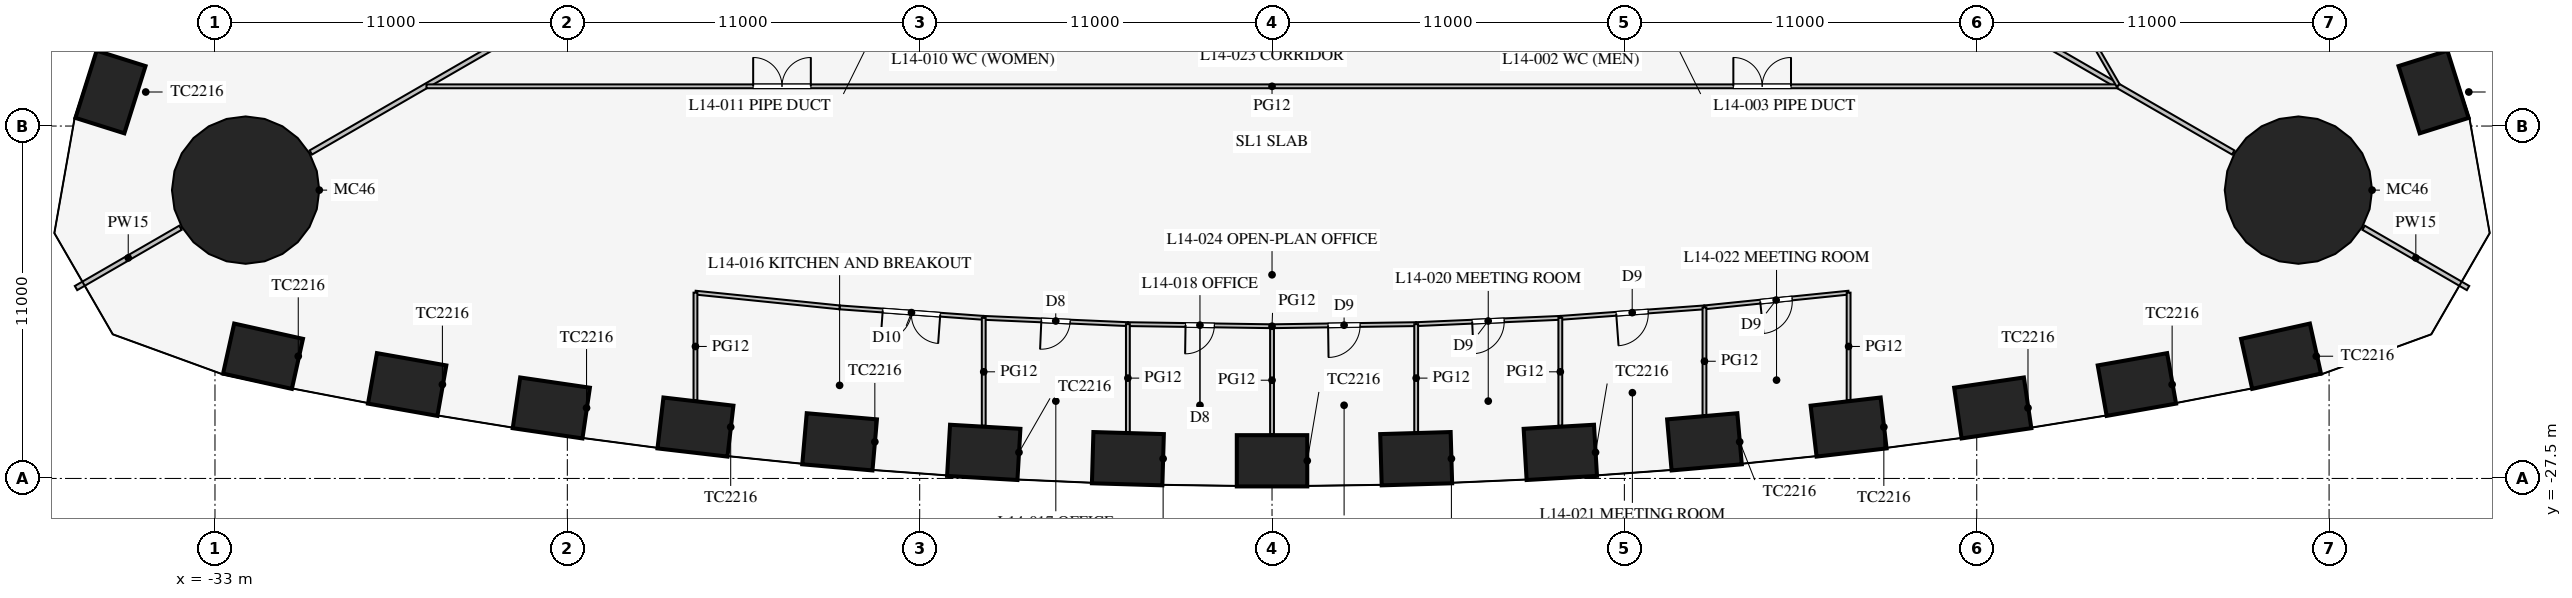
"""IFC4 building model, lengths in metres.
Left out: names, types, materials, properties, quantities, classifications, styles, units other than length and angle.
Written with IfcOpenShell. Run it as: python <this file> out.ifc"""

import sys

from ifc_helpers import new_model, si_unit, direction, frame, frame_2d, origin, origin_2d, place, context, subcontext, project, spatial, rectangle, circle, extrude, element, fill, save


model = new_model("IFC4")
c1 = context("Model", 3, precision=1e-05, world=origin(), true_north=direction((0.0, 1.0)))
c2 = subcontext(c1, "Body", "Model", "MODEL_VIEW")
j1 = project(units=[si_unit("LENGTHUNIT", "METRE"), si_unit("PLANEANGLEUNIT", "RADIAN")], contexts=[c1])
p1 = place(None, origin())
s1 = spatial("IfcSite", under=j1, at=p1, CompositionType="ELEMENT")
p2 = place(p1, origin())
s2 = spatial("IfcBuilding", under=s1, at=p2, CompositionType="ELEMENT")
p3 = place(p2, frame((0.0, 0.0, 62.7)))
s3 = spatial("IfcBuildingStorey", under=s2, at=p3, CompositionType="ELEMENT", Elevation=62.7)
for number, where, z_axis, x_axis in (
    (1, (-31.5, -23.685, 0.0), (0.0, 0.0, 1.0), (0.976, -0.217, 0.0)),
    (2, (-27.0, -24.568, 0.0), (0.0, 0.0, 1.0), (0.985, -0.174, 0.0)),
    (3, (-22.5, -25.299, 0.0), (0.0, 0.0, 1.0), (0.989, -0.145, 0.0)),
    (4, (-18.0, -25.895, 0.0), (0.0, 0.0, 1.0), (0.993, -0.116, 0.0)),
    (5, (-13.5, -26.357, 0.0), (0.0, 0.0, 1.0), (0.996, -0.087, 0.0)),
    (6, (-9.0, -26.686, 0.0), (0.0, 0.0, 1.0), (0.998, -0.058, 0.0)),
    (7, (-4.5, -26.883, 0.0), (0.0, 0.0, 1.0), (1.0, -0.029, 0.0)),
    (8, (0.0, -26.949, 0.0), (0.0, 0.0, 1.0), (1.0, 0.0, 0.0)),
    (9, (4.5, -26.883, 0.0), (0.0, 0.0, 1.0), (1.0, 0.029, 0.0)),
    (10, (9.0, -26.686, 0.0), (0.0, 0.0, 1.0), (0.998, 0.058, 0.0)),
    (11, (13.5, -26.357, 0.0), (0.0, 0.0, 1.0), (0.996, 0.087, 0.0)),
    (12, (18.0, -25.895, 0.0), (0.0, 0.0, 1.0), (0.993, 0.116, 0.0)),
    (13, (22.5, -25.299, 0.0), (0.0, 0.0, 1.0), (0.989, 0.145, 0.0)),
    (14, (27.0, -24.568, 0.0), (0.0, 0.0, 1.0), (0.985, 0.174, 0.0)),
    (15, (31.5, -23.685, 0.0), (0.0, 0.0, 1.0), (0.976, 0.217, 0.0)),
    (16, (36.262, -15.438, 0.0), (0.0, 0.0, 1.0), (-0.3, 0.954, 0.0)),
    (17, (-36.262, -15.438, 0.0), (0.0, 0.0, 1.0), (-0.3, -0.954, 0.0)),
):
    element("IfcColumn", number, at=place(p3, frame(where, z_axis=z_axis, x_axis=x_axis)), inside=s3, PredefinedType="COLUMN", context=c2, shape_type="SweptSolid", body=[
        extrude(rectangle(XDim=2.2, YDim=1.6, at=origin_2d()), origin(), (0.0, 0.0, 1.0), 4.2),
    ])
for number, where, z_axis, x_axis in (
    (18, (32.043, -18.5, 0.0), (0.0, 0.0, 1.0), (1.0, 0.0, 0.0)),
    (19, (-32.043, -18.5, 0.0), (0.0, 0.0, 1.0), (1.0, 0.0, 0.0)),
):
    element("IfcColumn", number, at=place(p3, frame(where, z_axis=z_axis, x_axis=x_axis)), inside=s3, PredefinedType="COLUMN", context=c2, shape_type="SweptSolid", body=[
        extrude(circle(Radius=2.3, at=origin_2d()), origin(), (0.0, 0.0, 1.0), 4.2),
    ])
p4 = place(p3, frame((14.203, -8.2, 0.0), z_axis=(0.0, 0.0, 1.0), x_axis=(0.866024965723, -0.500000758745, 0.0)))
e20 = element("IfcWall", 20, at=p4, inside=s3, PredefinedType="PARTITIONING", context=c2, shape_type="SweptSolid", body=[
    extrude(rectangle(XDim=18.25, YDim=0.15, at=frame_2d((9.125, 0.0))), origin(), (0.0, 0.0, 1.0), 2.3),
])
p5 = place(p3, frame((34.078, -19.675, 0.0), z_axis=(0.0, 0.0, 1.0), x_axis=(0.866019247219, -0.500010663332, 0.0)))
e21 = element("IfcWall", 21, at=p5, inside=s3, PredefinedType="PARTITIONING", context=c2, shape_type="SweptSolid", body=[
    extrude(rectangle(XDim=3.764, YDim=0.15, at=frame_2d((1.882, 0.0))), origin(), (0.0, 0.0, 1.0), 2.3),
])
p6 = place(p3, frame((-14.203, -8.2, 0.0), z_axis=(0.0, 0.0, 1.0), x_axis=(-0.866024965723, -0.500000758745, 0.0)))
e22 = element("IfcWall", 22, at=p6, inside=s3, PredefinedType="PARTITIONING", context=c2, shape_type="SweptSolid", body=[
    extrude(rectangle(XDim=18.25, YDim=0.15, at=frame_2d((9.125, 0.0))), origin(), (0.0, 0.0, 1.0), 2.3),
])
p7 = place(p3, frame((-34.078, -19.675, 0.0), z_axis=(0.0, 0.0, 1.0), x_axis=(-0.866019247219, -0.500010663332, 0.0)))
e23 = element("IfcWall", 23, at=p7, inside=s3, PredefinedType="PARTITIONING", context=c2, shape_type="SweptSolid", body=[
    extrude(rectangle(XDim=3.764, YDim=0.15, at=frame_2d((1.882, 0.0))), origin(), (0.0, 0.0, 1.0), 2.3),
])
p8 = place(p3, frame((-26.398, -15.26, 0.0), z_axis=(0.0, 0.0, 1.0), x_axis=(1.0, 0.0, 0.0)))
e24 = element("IfcWall", 24, at=p8, inside=s3, PredefinedType="PARTITIONING", context=c2, shape_type="SweptSolid", body=[
    extrude(rectangle(XDim=52.796, YDim=0.12, at=frame_2d((26.398, 0.0))), origin(), (0.0, 0.0, 1.0), 2.9),
])
p9 = place(p8, frame((10.2, 0.0, 0.15)))
e25 = element("IfcOpeningElement", 25, at=p9, cuts=e24, PredefinedType="OPENING", context=c2, shape_type="SweptSolid", body=[
    extrude(rectangle(XDim=1.8, YDim=2.1, at=frame_2d((0.9, 1.05))), frame((0.0, 0.07, 0.0), z_axis=(0.0, -1.0, 0.0), x_axis=(1.0, 0.0, 0.0)), (0.0, 0.0, 1.0), 0.14),
])
p10 = place(p8, frame((40.8, 0.0, 0.15)))
e26 = element("IfcOpeningElement", 26, at=p10, cuts=e24, PredefinedType="OPENING", context=c2, shape_type="SweptSolid", body=[
    extrude(rectangle(XDim=1.8, YDim=2.1, at=frame_2d((0.9, 1.05))), frame((0.0, 0.07, 0.0), z_axis=(0.0, -1.0, 0.0), x_axis=(1.0, 0.0, 0.0)), (0.0, 0.0, 1.0), 0.14),
])
p11 = place(p3, frame((0.0, -22.749, 0.0), z_axis=(0.0, 0.0, 1.0), x_axis=(0.999894311967, 0.014538393859, 0.0)))
e27 = element("IfcWall", 27, at=p11, inside=s3, PredefinedType="PARTITIONING", context=c2, shape_type="SweptSolid", body=[
    extrude(rectangle(XDim=4.5, YDim=0.12, at=frame_2d((2.25, 0.0))), origin(), (0.0, 0.0, 1.0), 2.9),
])
p12 = place(p11, frame((1.75, 0.0, 0.15)))
e28 = element("IfcOpeningElement", 28, at=p12, cuts=e27, PredefinedType="OPENING", context=c2, shape_type="SweptSolid", body=[
    extrude(rectangle(XDim=1.0, YDim=2.1, at=frame_2d((0.5, 1.05))), frame((0.0, 0.07, 0.0), z_axis=(0.0, -1.0, 0.0), x_axis=(1.0, 0.0, 0.0)), (0.0, 0.0, 1.0), 0.14),
])
p13 = place(p3, frame((13.5, -22.16, 0.0), z_axis=(0.0, 0.0, 1.0), x_axis=(0.994833141332, 0.101523499286, 0.0)))
e29 = element("IfcWall", 29, at=p13, inside=s3, PredefinedType="PARTITIONING", context=c2, shape_type="SweptSolid", body=[
    extrude(rectangle(XDim=4.523, YDim=0.12, at=frame_2d((2.262, 0.0))), origin(), (0.0, 0.0, 1.0), 2.9),
])
p14 = place(p13, frame((1.75, 0.0, 0.15)))
e30 = element("IfcOpeningElement", 30, at=p14, cuts=e29, PredefinedType="OPENING", context=c2, shape_type="SweptSolid", body=[
    extrude(rectangle(XDim=1.0, YDim=2.1, at=frame_2d((0.5, 1.05))), frame((0.0, 0.07, 0.0), z_axis=(0.0, -1.0, 0.0), x_axis=(1.0, 0.0, 0.0)), (0.0, 0.0, 1.0), 0.14),
])
p15 = place(p3, frame((4.5, -22.683, 0.0), z_axis=(0.0, 0.0, 1.0), x_axis=(0.999052370647, 0.043524254212, 0.0)))
e31 = element("IfcWall", 31, at=p15, inside=s3, PredefinedType="PARTITIONING", context=c2, shape_type="SweptSolid", body=[
    extrude(rectangle(XDim=4.504, YDim=0.12, at=frame_2d((2.252, 0.0))), origin(), (0.0, 0.0, 1.0), 2.9),
])
p16 = place(p15, frame((1.75, 0.0, 0.15)))
e32 = element("IfcOpeningElement", 32, at=p16, cuts=e31, PredefinedType="OPENING", context=c2, shape_type="SweptSolid", body=[
    extrude(rectangle(XDim=1.0, YDim=2.1, at=frame_2d((0.5, 1.05))), frame((0.0, 0.07, 0.0), z_axis=(0.0, -1.0, 0.0), x_axis=(1.0, 0.0, 0.0)), (0.0, 0.0, 1.0), 0.14),
])
p17 = place(p3, frame((9.0, -22.487, 0.0), z_axis=(0.0, 0.0, 1.0), x_axis=(0.997363894896, 0.072562119306, 0.0)))
e33 = element("IfcWall", 33, at=p17, inside=s3, PredefinedType="PARTITIONING", context=c2, shape_type="SweptSolid", body=[
    extrude(rectangle(XDim=4.512, YDim=0.12, at=frame_2d((2.256, 0.0))), origin(), (0.0, 0.0, 1.0), 2.9),
])
p18 = place(p17, frame((1.75, 0.0, 0.15)))
e34 = element("IfcOpeningElement", 34, at=p18, cuts=e33, PredefinedType="OPENING", context=c2, shape_type="SweptSolid", body=[
    extrude(rectangle(XDim=1.0, YDim=2.1, at=frame_2d((0.5, 1.05))), frame((0.0, 0.07, 0.0), z_axis=(0.0, -1.0, 0.0), x_axis=(1.0, 0.0, 0.0)), (0.0, 0.0, 1.0), 0.14),
])
p19 = place(p3, frame((-13.5, -22.16, 0.0), z_axis=(0.0, 0.0, 1.0), x_axis=(0.997363894896, -0.072562119306, 0.0)))
e35 = element("IfcWall", 35, at=p19, inside=s3, PredefinedType="PARTITIONING", context=c2, shape_type="SweptSolid", body=[
    extrude(rectangle(XDim=4.512, YDim=0.12, at=frame_2d((2.256, 0.0))), origin(), (0.0, 0.0, 1.0), 2.9),
])
p20 = place(p19, frame((1.35, 0.0, 0.15)))
e36 = element("IfcOpeningElement", 36, at=p20, cuts=e35, PredefinedType="OPENING", context=c2, shape_type="SweptSolid", body=[
    extrude(rectangle(XDim=1.8, YDim=2.1, at=frame_2d((0.9, 1.05))), frame((0.0, 0.07, 0.0), z_axis=(0.0, -1.0, 0.0), x_axis=(1.0, 0.0, 0.0)), (0.0, 0.0, 1.0), 0.14),
])
p21 = place(p3, frame((-18.0, -21.701, 0.0), z_axis=(0.0, 0.0, 1.0), x_axis=(0.994833141332, -0.101523499286, 0.0)))
e37 = element("IfcWall", 37, at=p21, inside=s3, PredefinedType="PARTITIONING", context=c2, shape_type="SweptSolid", body=[
    extrude(rectangle(XDim=4.523, YDim=0.12, at=frame_2d((2.262, 0.0))), origin(), (0.0, 0.0, 1.0), 2.9),
])
p22 = place(p3, frame((-4.5, -22.683, 0.0), z_axis=(0.0, 0.0, 1.0), x_axis=(0.999894311967, -0.014538393859, 0.0)))
e38 = element("IfcWall", 38, at=p22, inside=s3, PredefinedType="PARTITIONING", context=c2, shape_type="SweptSolid", body=[
    extrude(rectangle(XDim=4.5, YDim=0.12, at=frame_2d((2.25, 0.0))), origin(), (0.0, 0.0, 1.0), 2.9),
])
p23 = place(p22, frame((1.8, 0.0, 0.15)))
e39 = element("IfcOpeningElement", 39, at=p23, cuts=e38, PredefinedType="OPENING", context=c2, shape_type="SweptSolid", body=[
    extrude(rectangle(XDim=0.9, YDim=2.1, at=frame_2d((0.45, 1.05))), frame((0.0, 0.07, 0.0), z_axis=(0.0, -1.0, 0.0), x_axis=(1.0, 0.0, 0.0)), (0.0, 0.0, 1.0), 0.14),
])
p24 = place(p3, frame((-9.0, -22.487, 0.0), z_axis=(0.0, 0.0, 1.0), x_axis=(0.999052370647, -0.043524254212, 0.0)))
e40 = element("IfcWall", 40, at=p24, inside=s3, PredefinedType="PARTITIONING", context=c2, shape_type="SweptSolid", body=[
    extrude(rectangle(XDim=4.504, YDim=0.12, at=frame_2d((2.252, 0.0))), origin(), (0.0, 0.0, 1.0), 2.9),
])
p25 = place(p24, frame((1.8, 0.0, 0.15)))
e41 = element("IfcOpeningElement", 41, at=p25, cuts=e40, PredefinedType="OPENING", context=c2, shape_type="SweptSolid", body=[
    extrude(rectangle(XDim=0.9, YDim=2.1, at=frame_2d((0.45, 1.05))), frame((0.0, 0.07, 0.0), z_axis=(0.0, -1.0, 0.0), x_axis=(1.0, 0.0, 0.0)), (0.0, 0.0, 1.0), 0.14),
])
p26 = place(p3, frame((0.0, -22.749, 0.0), z_axis=(0.0, 0.0, 1.0), x_axis=(0.0, -1.0, 0.0)))
e42 = element("IfcWall", 42, at=p26, inside=s3, PredefinedType="PARTITIONING", context=c2, shape_type="SweptSolid", body=[
    extrude(rectangle(XDim=3.37, YDim=0.12, at=frame_2d((1.685, 0.0))), origin(), (0.0, 0.0, 1.0), 2.8),
])
p27 = place(p3, frame((13.5, -22.16, 0.0), z_axis=(0.0, 0.0, 1.0), x_axis=(0.0, -1.0, 0.0)))
e43 = element("IfcWall", 43, at=p27, inside=s3, PredefinedType="PARTITIONING", context=c2, shape_type="SweptSolid", body=[
    extrude(rectangle(XDim=3.364, YDim=0.12, at=frame_2d((1.682, 0.0))), origin(), (0.0, 0.0, 1.0), 2.6),
])
p28 = place(p3, frame((18.0, -21.701, 0.0), z_axis=(0.0, 0.0, 1.0), x_axis=(0.0, -1.0, 0.0)))
e44 = element("IfcWall", 44, at=p28, inside=s3, PredefinedType="PARTITIONING", context=c2, shape_type="SweptSolid", body=[
    extrude(rectangle(XDim=3.359, YDim=0.12, at=frame_2d((1.679, 0.0))), origin(), (0.0, 0.0, 1.0), 2.6),
])
p29 = place(p3, frame((4.5, -22.683, 0.0), z_axis=(0.0, 0.0, 1.0), x_axis=(0.0, -1.0, 0.0)))
e45 = element("IfcWall", 45, at=p29, inside=s3, PredefinedType="PARTITIONING", context=c2, shape_type="SweptSolid", body=[
    extrude(rectangle(XDim=3.369, YDim=0.12, at=frame_2d((1.685, 0.0))), origin(), (0.0, 0.0, 1.0), 2.8),
])
p30 = place(p3, frame((9.0, -22.487, 0.0), z_axis=(0.0, 0.0, 1.0), x_axis=(0.0, -1.0, 0.0)))
e46 = element("IfcWall", 46, at=p30, inside=s3, PredefinedType="PARTITIONING", context=c2, shape_type="SweptSolid", body=[
    extrude(rectangle(XDim=3.367, YDim=0.12, at=frame_2d((1.684, 0.0))), origin(), (0.0, 0.0, 1.0), 2.8),
])
p31 = place(p3, frame((-18.0, -21.701, 0.0), z_axis=(0.0, 0.0, 1.0), x_axis=(0.0, -1.0, 0.0)))
e47 = element("IfcWall", 47, at=p31, inside=s3, PredefinedType="PARTITIONING", context=c2, shape_type="SweptSolid", body=[
    extrude(rectangle(XDim=3.359, YDim=0.12, at=frame_2d((1.679, 0.0))), origin(), (0.0, 0.0, 1.0), 2.6),
])
p32 = place(p3, frame((-4.5, -22.683, 0.0), z_axis=(0.0, 0.0, 1.0), x_axis=(0.0, -1.0, 0.0)))
e48 = element("IfcWall", 48, at=p32, inside=s3, PredefinedType="PARTITIONING", context=c2, shape_type="SweptSolid", body=[
    extrude(rectangle(XDim=3.369, YDim=0.12, at=frame_2d((1.685, 0.0))), origin(), (0.0, 0.0, 1.0), 2.8),
])
p33 = place(p3, frame((-9.0, -22.487, 0.0), z_axis=(0.0, 0.0, 1.0), x_axis=(0.0, -1.0, 0.0)))
e49 = element("IfcWall", 49, at=p33, inside=s3, PredefinedType="PARTITIONING", context=c2, shape_type="SweptSolid", body=[
    extrude(rectangle(XDim=3.367, YDim=0.12, at=frame_2d((1.684, 0.0))), origin(), (0.0, 0.0, 1.0), 2.8),
])
p34 = place(p3, frame((26.415, -15.231, 0.0), z_axis=(0.0, 0.0, 1.0), x_axis=(-0.50000091641, 0.866024874695, 0.0)))
e50 = element("IfcWall", 50, at=p34, inside=s3, PredefinedType="PARTITIONING", context=c2, shape_type="SweptSolid", body=[
    extrude(rectangle(XDim=52.796, YDim=0.12, at=frame_2d((26.398, 0.0))), origin(), (0.0, 0.0, 1.0), 2.9),
])
p35 = place(p34, frame((10.2, 0.0, 0.15)))
e51 = element("IfcOpeningElement", 51, at=p35, cuts=e50, PredefinedType="OPENING", context=c2, shape_type="SweptSolid", body=[
    extrude(rectangle(XDim=1.8, YDim=2.1, at=frame_2d((0.9, 1.05))), frame((0.0, 0.07, 0.0), z_axis=(0.0, -1.0, 0.0), x_axis=(1.0, 0.0, 0.0)), (0.0, 0.0, 1.0), 0.14),
])
p36 = place(p34, frame((40.8, 0.0, 0.15)))
e52 = element("IfcOpeningElement", 52, at=p36, cuts=e50, PredefinedType="OPENING", context=c2, shape_type="SweptSolid", body=[
    extrude(rectangle(XDim=1.8, YDim=2.1, at=frame_2d((0.9, 1.05))), frame((0.0, 0.07, 0.0), z_axis=(0.0, -1.0, 0.0), x_axis=(1.0, 0.0, 0.0)), (0.0, 0.0, 1.0), 0.14),
])
p37 = place(p20, frame((1.8, 0.0, 0.0), z_axis=(0.0, 0.0, 1.0), x_axis=(-1.0, 0.0, 0.0)))
e53 = element("IfcDoor", 53, at=p37, inside=s3, OperationType="DOUBLE_DOOR_SINGLE_SWING", PredefinedType="DOOR", context=c2, shape_type="SweptSolid", body=[
    extrude(rectangle(XDim=1.8, YDim=2.1, at=frame_2d((0.9, 1.05))), frame((0.0, 0.025, 0.0), z_axis=(0.0, -1.0, 0.0), x_axis=(1.0, 0.0, 0.0)), (0.0, 0.0, 1.0), 0.05),
])
fill(e36, e53)
p38 = place(p25, frame((0.9, 0.0, 0.0), z_axis=(0.0, 0.0, 1.0), x_axis=(-1.0, 0.0, 0.0)))
e54 = element("IfcDoor", 54, at=p38, inside=s3, OperationType="SINGLE_SWING_RIGHT", PredefinedType="DOOR", context=c2, shape_type="SweptSolid", body=[
    extrude(rectangle(XDim=0.9, YDim=2.1, at=frame_2d((0.45, 1.05))), frame((0.0, 0.025, 0.0), z_axis=(0.0, -1.0, 0.0), x_axis=(1.0, 0.0, 0.0)), (0.0, 0.0, 1.0), 0.05),
])
fill(e41, e54)
p39 = place(p23, frame((0.9, 0.0, 0.0), z_axis=(0.0, 0.0, 1.0), x_axis=(-1.0, 0.0, 0.0)))
e55 = element("IfcDoor", 55, at=p39, inside=s3, OperationType="SINGLE_SWING_RIGHT", PredefinedType="DOOR", context=c2, shape_type="SweptSolid", body=[
    extrude(rectangle(XDim=0.9, YDim=2.1, at=frame_2d((0.45, 1.05))), frame((0.0, 0.025, 0.0), z_axis=(0.0, -1.0, 0.0), x_axis=(1.0, 0.0, 0.0)), (0.0, 0.0, 1.0), 0.05),
])
fill(e39, e55)
p40 = place(p12, frame((1.0, 0.0, 0.0), z_axis=(0.0, 0.0, 1.0), x_axis=(-1.0, 0.0, 0.0)))
e56 = element("IfcDoor", 56, at=p40, inside=s3, OperationType="SINGLE_SWING_RIGHT", PredefinedType="DOOR", context=c2, shape_type="SweptSolid", body=[
    extrude(rectangle(XDim=1.0, YDim=2.1, at=frame_2d((0.5, 1.05))), frame((0.0, 0.025, 0.0), z_axis=(0.0, -1.0, 0.0), x_axis=(1.0, 0.0, 0.0)), (0.0, 0.0, 1.0), 0.05),
])
fill(e28, e56)
p41 = place(p16, frame((1.0, 0.0, 0.0), z_axis=(0.0, 0.0, 1.0), x_axis=(-1.0, 0.0, 0.0)))
e57 = element("IfcDoor", 57, at=p41, inside=s3, OperationType="SINGLE_SWING_RIGHT", PredefinedType="DOOR", context=c2, shape_type="SweptSolid", body=[
    extrude(rectangle(XDim=1.0, YDim=2.1, at=frame_2d((0.5, 1.05))), frame((0.0, 0.025, 0.0), z_axis=(0.0, -1.0, 0.0), x_axis=(1.0, 0.0, 0.0)), (0.0, 0.0, 1.0), 0.05),
])
fill(e32, e57)
p42 = place(p18, frame((1.0, 0.0, 0.0), z_axis=(0.0, 0.0, 1.0), x_axis=(-1.0, 0.0, 0.0)))
e58 = element("IfcDoor", 58, at=p42, inside=s3, OperationType="SINGLE_SWING_RIGHT", PredefinedType="DOOR", context=c2, shape_type="SweptSolid", body=[
    extrude(rectangle(XDim=1.0, YDim=2.1, at=frame_2d((0.5, 1.05))), frame((0.0, 0.025, 0.0), z_axis=(0.0, -1.0, 0.0), x_axis=(1.0, 0.0, 0.0)), (0.0, 0.0, 1.0), 0.05),
])
fill(e34, e58)
p43 = place(p14, frame((1.0, 0.0, 0.0), z_axis=(0.0, 0.0, 1.0), x_axis=(-1.0, 0.0, 0.0)))
e59 = element("IfcDoor", 59, at=p43, inside=s3, OperationType="SINGLE_SWING_RIGHT", PredefinedType="DOOR", context=c2, shape_type="SweptSolid", body=[
    extrude(rectangle(XDim=1.0, YDim=2.1, at=frame_2d((0.5, 1.05))), frame((0.0, 0.025, 0.0), z_axis=(0.0, -1.0, 0.0), x_axis=(1.0, 0.0, 0.0)), (0.0, 0.0, 1.0), 0.05),
])
fill(e30, e59)
p44 = place(p9, origin())
e60 = element("IfcDoor", 60, at=p44, inside=s3, OperationType="DOUBLE_DOOR_SINGLE_SWING", PredefinedType="DOOR", context=c2, shape_type="SweptSolid", body=[
    extrude(rectangle(XDim=1.8, YDim=2.1, at=frame_2d((0.9, 1.05))), frame((0.0, 0.025, 0.0), z_axis=(0.0, -1.0, 0.0), x_axis=(1.0, 0.0, 0.0)), (0.0, 0.0, 1.0), 0.05),
])
fill(e25, e60)
p45 = place(p10, origin())
e61 = element("IfcDoor", 61, at=p45, inside=s3, OperationType="DOUBLE_DOOR_SINGLE_SWING", PredefinedType="DOOR", context=c2, shape_type="SweptSolid", body=[
    extrude(rectangle(XDim=1.8, YDim=2.1, at=frame_2d((0.9, 1.05))), frame((0.0, 0.025, 0.0), z_axis=(0.0, -1.0, 0.0), x_axis=(1.0, 0.0, 0.0)), (0.0, 0.0, 1.0), 0.05),
])
fill(e26, e61)
save(model, sys.argv[1])
